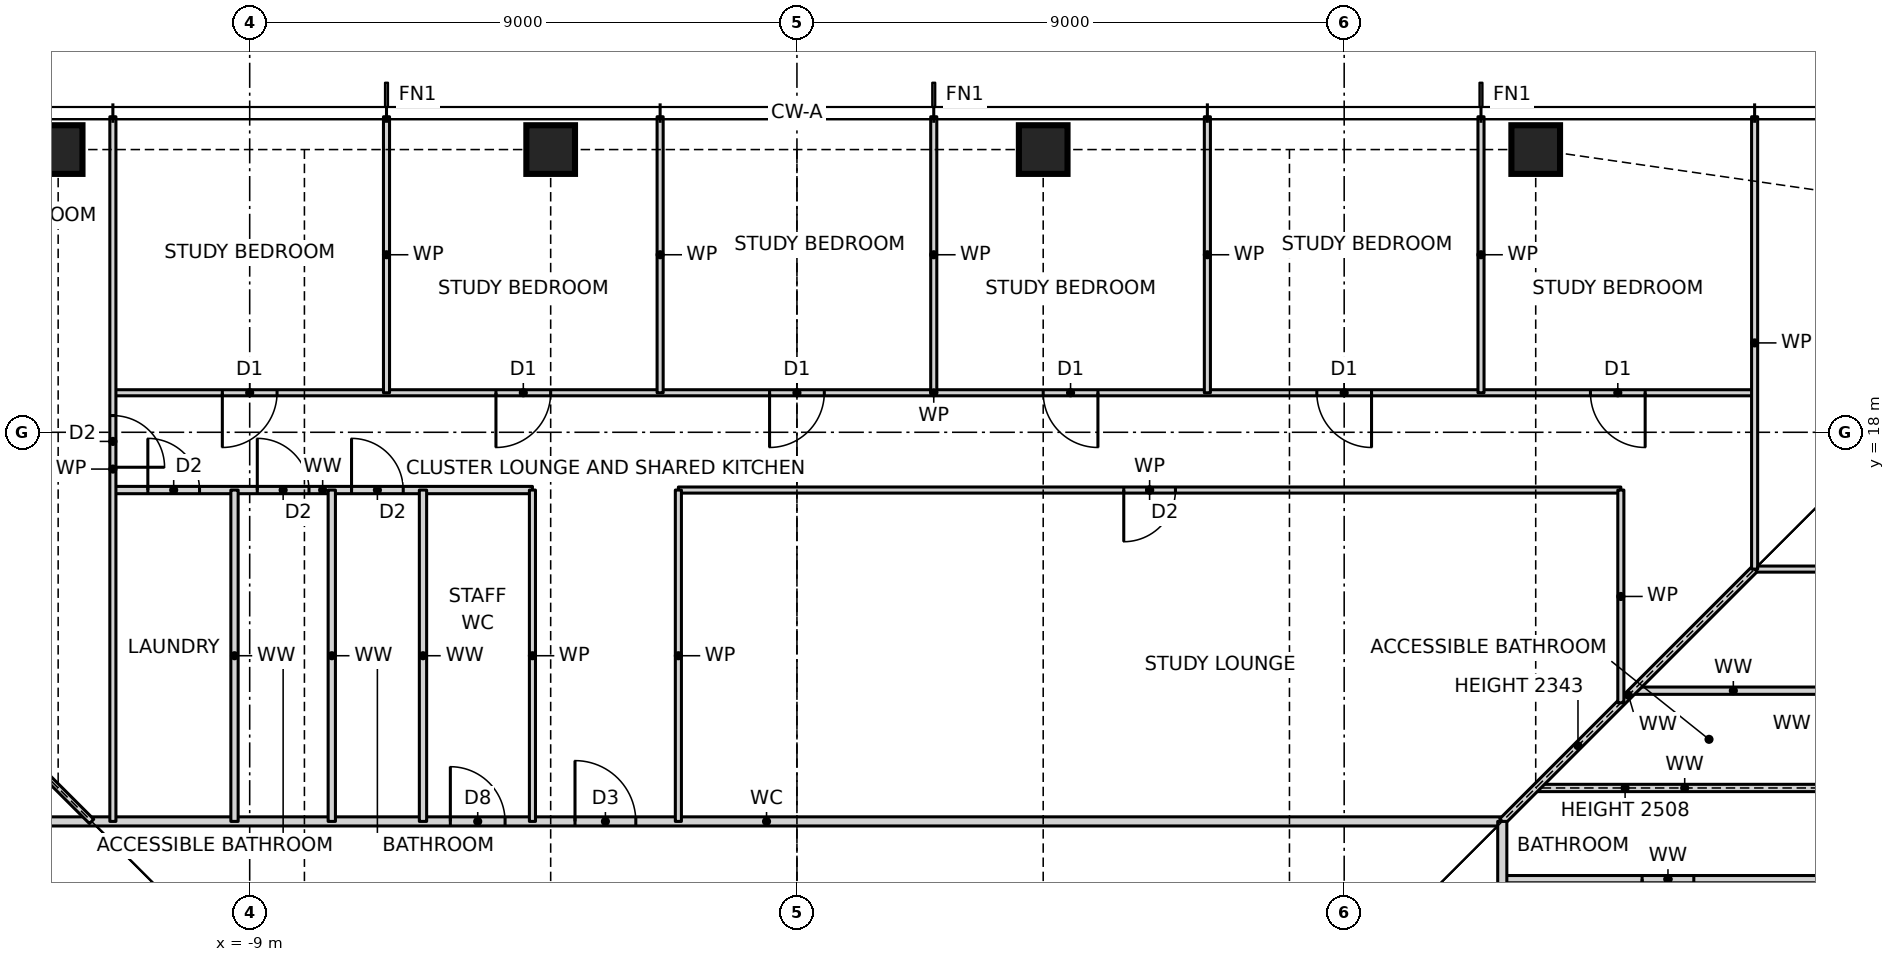
"""IFC4 building model, lengths in metres.
Left out: names, types, materials, properties, quantities, classifications, styles, units other than length and angle.
Written with IfcOpenShell. Run it as: python <this file> out.ifc"""

import sys

from ifc_helpers import new_model, si_unit, direction, frame, frame_2d, origin, origin_2d, place, context, subcontext, project, spatial, rectangle, hollow_rectangle, extrude, element, fill, save


model = new_model("IFC4")
c1 = context("Model", 3, precision=1e-05, world=origin(), true_north=direction((0.0, 1.0)))
c2 = subcontext(c1, "Body", "Model", "MODEL_VIEW")
j1 = project(units=[si_unit("LENGTHUNIT", "METRE"), si_unit("PLANEANGLEUNIT", "RADIAN")], contexts=[c1])
p1 = place(None, origin())
s1 = spatial("IfcSite", under=j1, at=p1, CompositionType="ELEMENT")
p2 = place(p1, origin())
s2 = spatial("IfcBuilding", under=s1, at=p2, CompositionType="ELEMENT")
p3 = place(p2, frame((0.0, 0.0, 53.5)))
s3 = spatial("IfcBuildingStorey", under=s2, at=p3, CompositionType="ELEMENT", Elevation=53.5)
for number, where, z_axis, x_axis in (
    (1, (12.15, 22.65, 0.0), (0.0, 0.0, 1.0), (1.0, 0.0, 0.0)),
    (2, (4.05, 22.65, 0.0), (0.0, 0.0, 1.0), (1.0, 0.0, 0.0)),
    (3, (-4.05, 22.65, 0.0), (0.0, 0.0, 1.0), (1.0, 0.0, 0.0)),
    (4, (-12.15, 22.65, 0.0), (0.0, 0.0, 1.0), (1.0, 0.0, 0.0)),
):
    element("IfcColumn", number, at=place(p3, frame(where, z_axis=z_axis, x_axis=x_axis)), inside=s3, PredefinedType="COLUMN", context=c2, shape_type="SweptSolid", body=[
        extrude(hollow_rectangle(XDim=0.8, YDim=0.8, WallThickness=0.09, at=origin_2d()), origin(), (0.0, 0.0, 1.0), 3.5),
    ])
p4 = place(p3, frame((11.6, 10.65, 0.0), z_axis=(0.0, 0.0, 1.0), x_axis=(1.0, 0.0, 0.0)))
e5 = element("IfcWall", 5, at=p4, inside=s3, PredefinedType="PARTITIONING", context=c2, shape_type="SweptSolid", body=[
    extrude(rectangle(XDim=5.45, YDim=0.12, at=frame_2d((2.725, 0.0))), origin(), (0.0, 0.0, 1.0), 3.27),
])
p5 = place(p4, frame((2.3, 0.0, 0.0)))
e6 = element("IfcOpeningElement", 6, at=p5, cuts=e5, PredefinedType="OPENING", context=c2, shape_type="SweptSolid", body=[
    extrude(rectangle(XDim=0.85, YDim=2.1, at=frame_2d((0.425, 1.05))), frame((0.0, 0.07, 0.0), z_axis=(0.0, -1.0, 0.0), x_axis=(1.0, 0.0, 0.0)), (0.0, 0.0, 1.0), 0.14),
])
p6 = place(p3, frame((-12.6, 11.6, 0.0), z_axis=(0.0, 0.0, 1.0), x_axis=(1.0, 0.0, 0.0)))
e7 = element("IfcWall", 7, at=p6, inside=s3, PredefinedType="PARTITIONING", context=c2, shape_type="SweptSolid", body=[
    extrude(rectangle(XDim=24.2, YDim=0.15, at=frame_2d((12.1, 0.0))), origin(), (0.0, 0.0, 1.0), 3.27),
])
p7 = place(p6, frame((8.95, 0.0, 0.0)))
e8 = element("IfcOpeningElement", 8, at=p7, cuts=e7, PredefinedType="OPENING", context=c2, shape_type="SweptSolid", body=[
    extrude(rectangle(XDim=1.0, YDim=2.1, at=frame_2d((0.5, 1.05))), frame((0.0, 0.085, 0.0), z_axis=(0.0, -1.0, 0.0), x_axis=(1.0, 0.0, 0.0)), (0.0, 0.0, 1.0), 0.17),
])
p8 = place(p6, frame((6.9, 0.0, 0.0)))
e9 = element("IfcOpeningElement", 9, at=p8, cuts=e7, PredefinedType="OPENING", context=c2, shape_type="SweptSolid", body=[
    extrude(rectangle(XDim=0.9, YDim=2.1, at=frame_2d((0.45, 1.05))), frame((0.0, 0.085, 0.0), z_axis=(0.0, -1.0, 0.0), x_axis=(1.0, 0.0, 0.0)), (0.0, 0.0, 1.0), 0.17),
])
p9 = place(p3, frame((12.15, 12.15, 0.0), z_axis=(0.0, 0.0, 1.0), x_axis=(1.0, 0.0, 0.0)))
e10 = element("IfcWall", 10, at=p9, inside=s3, PredefinedType="PARTITIONING", context=c2, shape_type="SweptSolid", body=[
    extrude(rectangle(XDim=4.9, YDim=0.12, at=frame_2d((2.45, 0.0))), origin(), (0.0, 0.0, 1.0), 2.508),
])
p10 = place(p3, frame((13.75, 13.75, 0.0), z_axis=(0.0, 0.0, 1.0), x_axis=(1.0, 0.0, 0.0)))
e11 = element("IfcWall", 11, at=p10, inside=s3, PredefinedType="PARTITIONING", context=c2, shape_type="SweptSolid", body=[
    extrude(rectangle(XDim=3.3, YDim=0.12, at=frame_2d((1.65, 0.0))), origin(), (0.0, 0.0, 1.0), 3.27),
])
p11 = place(p3, frame((15.75, 15.75, 0.0), z_axis=(0.0, 0.0, 1.0), x_axis=(1.0, 0.0, 0.0)))
e12 = element("IfcWall", 12, at=p11, inside=s3, PredefinedType="PARTITIONING", context=c2, shape_type="SweptSolid", body=[
    extrude(rectangle(XDim=7.44, YDim=0.1, at=frame_2d((3.72, 0.0))), origin(), (0.0, 0.0, 1.0), 3.27),
])
p12 = place(p11, frame((1.675, 0.0, 0.0)))
e13 = element("IfcOpeningElement", 13, at=p12, cuts=e12, PredefinedType="OPENING", context=c2, shape_type="SweptSolid", body=[
    extrude(rectangle(XDim=0.85, YDim=2.1, at=frame_2d((0.425, 1.05))), frame((0.0, 0.06, 0.0), z_axis=(0.0, -1.0, 0.0), x_axis=(1.0, 0.0, 0.0)), (0.0, 0.0, 1.0), 0.12),
])
p13 = place(p3, frame((-11.25, 17.05, 0.0), z_axis=(0.0, 0.0, 1.0), x_axis=(1.0, 0.0, 0.0)))
e14 = element("IfcWall", 14, at=p13, inside=s3, PredefinedType="PARTITIONING", context=c2, shape_type="SweptSolid", body=[
    extrude(rectangle(XDim=6.9, YDim=0.12, at=frame_2d((3.45, 0.0))), origin(), (0.0, 0.0, 1.0), 3.27),
])
p14 = place(p13, frame((3.925, 0.0, 0.0)))
e15 = element("IfcOpeningElement", 15, at=p14, cuts=e14, PredefinedType="OPENING", context=c2, shape_type="SweptSolid", body=[
    extrude(rectangle(XDim=0.85, YDim=2.1, at=frame_2d((0.425, 1.05))), frame((0.0, 0.07, 0.0), z_axis=(0.0, -1.0, 0.0), x_axis=(1.0, 0.0, 0.0)), (0.0, 0.0, 1.0), 0.14),
])
p15 = place(p13, frame((2.375, 0.0, 0.0)))
e16 = element("IfcOpeningElement", 16, at=p15, cuts=e14, PredefinedType="OPENING", context=c2, shape_type="SweptSolid", body=[
    extrude(rectangle(XDim=0.85, YDim=2.1, at=frame_2d((0.425, 1.05))), frame((0.0, 0.07, 0.0), z_axis=(0.0, -1.0, 0.0), x_axis=(1.0, 0.0, 0.0)), (0.0, 0.0, 1.0), 0.14),
])
p16 = place(p13, frame((0.575, 0.0, 0.0)))
e17 = element("IfcOpeningElement", 17, at=p16, cuts=e14, PredefinedType="OPENING", context=c2, shape_type="SweptSolid", body=[
    extrude(rectangle(XDim=0.85, YDim=2.1, at=frame_2d((0.425, 1.05))), frame((0.0, 0.07, 0.0), z_axis=(0.0, -1.0, 0.0), x_axis=(1.0, 0.0, 0.0)), (0.0, 0.0, 1.0), 0.14),
])
p17 = place(p3, frame((-1.95, 17.05, 0.0), z_axis=(0.0, 0.0, 1.0), x_axis=(1.0, 0.0, 0.0)))
e18 = element("IfcWall", 18, at=p17, inside=s3, PredefinedType="PARTITIONING", context=c2, shape_type="SweptSolid", body=[
    extrude(rectangle(XDim=15.5, YDim=0.1, at=frame_2d((7.75, 0.0))), origin(), (0.0, 0.0, 1.0), 3.27),
])
p18 = place(p17, frame((7.325, 0.0, 0.0)))
e19 = element("IfcOpeningElement", 19, at=p18, cuts=e18, PredefinedType="OPENING", context=c2, shape_type="SweptSolid", body=[
    extrude(rectangle(XDim=0.85, YDim=2.1, at=frame_2d((0.425, 1.05))), frame((0.0, 0.06, 0.0), z_axis=(0.0, -1.0, 0.0), x_axis=(1.0, 0.0, 0.0)), (0.0, 0.0, 1.0), 0.12),
])
p19 = place(p3, frame((-11.25, 18.65, 0.0), z_axis=(0.0, 0.0, 1.0), x_axis=(1.0, 0.0, 0.0)))
e20 = element("IfcWall", 20, at=p19, inside=s3, PredefinedType="PARTITIONING", context=c2, shape_type="SweptSolid", body=[
    extrude(rectangle(XDim=27.0, YDim=0.1, at=frame_2d((13.5, 0.0))), origin(), (0.0, 0.0, 1.0), 3.27),
])
p20 = place(p19, frame((24.3, 0.0, 0.0)))
e21 = element("IfcOpeningElement", 21, at=p20, cuts=e20, PredefinedType="OPENING", context=c2, shape_type="SweptSolid", body=[
    extrude(rectangle(XDim=0.9, YDim=2.1, at=frame_2d((0.45, 1.05))), frame((0.0, 0.06, 0.0), z_axis=(0.0, -1.0, 0.0), x_axis=(1.0, 0.0, 0.0)), (0.0, 0.0, 1.0), 0.12),
])
p21 = place(p19, frame((19.8, 0.0, 0.0)))
e22 = element("IfcOpeningElement", 22, at=p21, cuts=e20, PredefinedType="OPENING", context=c2, shape_type="SweptSolid", body=[
    extrude(rectangle(XDim=0.9, YDim=2.1, at=frame_2d((0.45, 1.05))), frame((0.0, 0.06, 0.0), z_axis=(0.0, -1.0, 0.0), x_axis=(1.0, 0.0, 0.0)), (0.0, 0.0, 1.0), 0.12),
])
p22 = place(p19, frame((15.3, 0.0, 0.0)))
e23 = element("IfcOpeningElement", 23, at=p22, cuts=e20, PredefinedType="OPENING", context=c2, shape_type="SweptSolid", body=[
    extrude(rectangle(XDim=0.9, YDim=2.1, at=frame_2d((0.45, 1.05))), frame((0.0, 0.06, 0.0), z_axis=(0.0, -1.0, 0.0), x_axis=(1.0, 0.0, 0.0)), (0.0, 0.0, 1.0), 0.12),
])
p23 = place(p19, frame((10.8, 0.0, 0.0)))
e24 = element("IfcOpeningElement", 24, at=p23, cuts=e20, PredefinedType="OPENING", context=c2, shape_type="SweptSolid", body=[
    extrude(rectangle(XDim=0.9, YDim=2.1, at=frame_2d((0.45, 1.05))), frame((0.0, 0.06, 0.0), z_axis=(0.0, -1.0, 0.0), x_axis=(1.0, 0.0, 0.0)), (0.0, 0.0, 1.0), 0.12),
])
p24 = place(p19, frame((6.3, 0.0, 0.0)))
e25 = element("IfcOpeningElement", 25, at=p24, cuts=e20, PredefinedType="OPENING", context=c2, shape_type="SweptSolid", body=[
    extrude(rectangle(XDim=0.9, YDim=2.1, at=frame_2d((0.45, 1.05))), frame((0.0, 0.06, 0.0), z_axis=(0.0, -1.0, 0.0), x_axis=(1.0, 0.0, 0.0)), (0.0, 0.0, 1.0), 0.12),
])
p25 = place(p19, frame((1.8, 0.0, 0.0)))
e26 = element("IfcOpeningElement", 26, at=p25, cuts=e20, PredefinedType="OPENING", context=c2, shape_type="SweptSolid", body=[
    extrude(rectangle(XDim=0.9, YDim=2.1, at=frame_2d((0.45, 1.05))), frame((0.0, 0.06, 0.0), z_axis=(0.0, -1.0, 0.0), x_axis=(1.0, 0.0, 0.0)), (0.0, 0.0, 1.0), 0.12),
])
p26 = place(p3, frame((11.6, 11.6, 0.0), z_axis=(0.0, 0.0, 1.0), x_axis=(0.707106781187, 0.707106781187, 0.0)))
e27 = element("IfcWall", 27, at=p26, inside=s3, PredefinedType="PARTITIONING", context=c2, shape_type="SweptSolid", body=[
    extrude(rectangle(XDim=5.869, YDim=0.12, at=frame_2d((2.935, 0.0))), origin(), (0.0, 0.0, 1.0), 2.343),
])
p27 = place(p3, frame((15.75, 15.75, 0.0), z_axis=(0.0, 0.0, 1.0), x_axis=(0.0, 1.0, 0.0)))
e28 = element("IfcWall", 28, at=p27, inside=s3, PredefinedType="PARTITIONING", context=c2, shape_type="SweptSolid", body=[
    extrude(rectangle(XDim=7.44, YDim=0.1, at=frame_2d((3.72, 0.0))), origin(), (0.0, 0.0, 1.0), 3.27),
])
p28 = place(p3, frame((13.55, 13.55, 0.0), z_axis=(0.0, 0.0, 1.0), x_axis=(0.0, 1.0, 0.0)))
e29 = element("IfcWall", 29, at=p28, inside=s3, PredefinedType="PARTITIONING", context=c2, shape_type="SweptSolid", body=[
    extrude(rectangle(XDim=3.5, YDim=0.1, at=frame_2d((1.75, 0.0))), origin(), (0.0, 0.0, 1.0), 3.27),
])
p29 = place(p3, frame((11.6, -11.6, 0.0), z_axis=(0.0, 0.0, 1.0), x_axis=(0.0, 1.0, 0.0)))
e30 = element("IfcWall", 30, at=p29, inside=s3, PredefinedType="PARTITIONING", context=c2, shape_type="SweptSolid", body=[
    extrude(rectangle(XDim=23.2, YDim=0.15, at=frame_2d((11.6, 0.0))), origin(), (0.0, 0.0, 1.0), 3.27),
])
p30 = place(p29, frame((20.55, 0.0, 0.0)))
e31 = element("IfcOpeningElement", 31, at=p30, cuts=e30, PredefinedType="OPENING", context=c2, shape_type="SweptSolid", body=[
    extrude(rectangle(XDim=1.0, YDim=2.1, at=frame_2d((0.5, 1.05))), frame((0.0, 0.085, 0.0), z_axis=(0.0, -1.0, 0.0), x_axis=(1.0, 0.0, 0.0)), (0.0, 0.0, 1.0), 0.17),
])
for number, where, z_axis, x_axis in (
    (32, (11.25, 18.65, 0.0), (0.0, 0.0, 1.0), (0.0, 1.0, 0.0)),
    (33, (6.75, 18.65, 0.0), (0.0, 0.0, 1.0), (0.0, 1.0, 0.0)),
    (34, (2.25, 18.65, 0.0), (0.0, 0.0, 1.0), (0.0, 1.0, 0.0)),
):
    element("IfcWall", number, at=place(p3, frame(where, z_axis=z_axis, x_axis=x_axis)), inside=s3, PredefinedType="PARTITIONING", context=c2, shape_type="SweptSolid", body=[
        extrude(rectangle(XDim=4.54, YDim=0.1, at=frame_2d((2.27, 0.0))), origin(), (0.0, 0.0, 1.0), 3.27),
    ])
p31 = place(p3, frame((-1.95, 11.6, 0.0), z_axis=(0.0, 0.0, 1.0), x_axis=(0.0, 1.0, 0.0)))
e35 = element("IfcWall", 35, at=p31, inside=s3, PredefinedType="PARTITIONING", context=c2, shape_type="SweptSolid", body=[
    extrude(rectangle(XDim=5.45, YDim=0.1, at=frame_2d((2.725, 0.0))), origin(), (0.0, 0.0, 1.0), 3.27),
])
p32 = place(p3, frame((-2.25, 18.65, 0.0), z_axis=(0.0, 0.0, 1.0), x_axis=(0.0, 1.0, 0.0)))
e36 = element("IfcWall", 36, at=p32, inside=s3, PredefinedType="PARTITIONING", context=c2, shape_type="SweptSolid", body=[
    extrude(rectangle(XDim=4.54, YDim=0.1, at=frame_2d((2.27, 0.0))), origin(), (0.0, 0.0, 1.0), 3.27),
])
p33 = place(p3, frame((-4.35, 11.6, 0.0), z_axis=(0.0, 0.0, 1.0), x_axis=(0.0, 1.0, 0.0)))
e37 = element("IfcWall", 37, at=p33, inside=s3, PredefinedType="PARTITIONING", context=c2, shape_type="SweptSolid", body=[
    extrude(rectangle(XDim=5.45, YDim=0.1, at=frame_2d((2.725, 0.0))), origin(), (0.0, 0.0, 1.0), 3.27),
])
p34 = place(p3, frame((-6.15, 11.6, 0.0), z_axis=(0.0, 0.0, 1.0), x_axis=(0.0, 1.0, 0.0)))
e38 = element("IfcWall", 38, at=p34, inside=s3, PredefinedType="PARTITIONING", context=c2, shape_type="SweptSolid", body=[
    extrude(rectangle(XDim=5.45, YDim=0.12, at=frame_2d((2.725, 0.0))), origin(), (0.0, 0.0, 1.0), 3.27),
])
p35 = place(p3, frame((-6.75, 18.65, 0.0), z_axis=(0.0, 0.0, 1.0), x_axis=(0.0, 1.0, 0.0)))
e39 = element("IfcWall", 39, at=p35, inside=s3, PredefinedType="PARTITIONING", context=c2, shape_type="SweptSolid", body=[
    extrude(rectangle(XDim=4.54, YDim=0.1, at=frame_2d((2.27, 0.0))), origin(), (0.0, 0.0, 1.0), 3.27),
])
for number, where, z_axis, x_axis in (
    (40, (-7.65, 11.6, 0.0), (0.0, 0.0, 1.0), (0.0, 1.0, 0.0)),
    (41, (-9.25, 11.6, 0.0), (0.0, 0.0, 1.0), (0.0, 1.0, 0.0)),
):
    element("IfcWall", number, at=place(p3, frame(where, z_axis=z_axis, x_axis=x_axis)), inside=s3, PredefinedType="PARTITIONING", context=c2, shape_type="SweptSolid", body=[
        extrude(rectangle(XDim=5.45, YDim=0.12, at=frame_2d((2.725, 0.0))), origin(), (0.0, 0.0, 1.0), 3.27),
    ])
p36 = place(p3, frame((-11.25, 11.6, 0.0), z_axis=(0.0, 0.0, 1.0), x_axis=(0.0, 1.0, 0.0)))
e42 = element("IfcWall", 42, at=p36, inside=s3, PredefinedType="PARTITIONING", context=c2, shape_type="SweptSolid", body=[
    extrude(rectangle(XDim=11.59, YDim=0.1, at=frame_2d((5.795, 0.0))), origin(), (0.0, 0.0, 1.0), 3.27),
])
p37 = place(p36, frame((5.825, 0.0, 0.0)))
e43 = element("IfcOpeningElement", 43, at=p37, cuts=e42, PredefinedType="OPENING", context=c2, shape_type="SweptSolid", body=[
    extrude(rectangle(XDim=0.85, YDim=2.1, at=frame_2d((0.425, 1.05))), frame((0.0, 0.06, 0.0), z_axis=(0.0, -1.0, 0.0), x_axis=(1.0, 0.0, 0.0)), (0.0, 0.0, 1.0), 0.12),
])
p38 = place(p3, frame((-11.6, 11.6, 0.0), z_axis=(0.0, 0.0, 1.0), x_axis=(-0.707106781187, 0.707106781187, 0.0)))
e44 = element("IfcWall", 44, at=p38, inside=s3, PredefinedType="PARTITIONING", context=c2, shape_type="SweptSolid", body=[
    extrude(rectangle(XDim=5.869, YDim=0.1, at=frame_2d((2.935, 0.0))), origin(), (0.0, 0.0, 1.0), 2.343),
])
p39 = place(p5, frame((0.85, 0.0, 0.0), z_axis=(0.0, 0.0, 1.0), x_axis=(-1.0, 0.0, 0.0)))
e45 = element("IfcDoor", 45, at=p39, inside=s3, OperationType="SINGLE_SWING_RIGHT", PredefinedType="DOOR", context=c2, shape_type="SweptSolid", body=[
    extrude(rectangle(XDim=0.85, YDim=2.1, at=frame_2d((0.425, 1.05))), frame((0.0, 0.025, 0.0), z_axis=(0.0, -1.0, 0.0), x_axis=(1.0, 0.0, 0.0)), (0.0, 0.0, 1.0), 0.05),
])
fill(e6, e45)
p40 = place(p20, frame((0.9, 0.0, 0.0), z_axis=(0.0, 0.0, 1.0), x_axis=(-1.0, 0.0, 0.0)))
e46 = element("IfcDoor", 46, at=p40, inside=s3, OperationType="SINGLE_SWING_LEFT", PredefinedType="DOOR", context=c2, shape_type="SweptSolid", body=[
    extrude(rectangle(XDim=0.9, YDim=2.1, at=frame_2d((0.45, 1.05))), frame((0.0, 0.025, 0.0), z_axis=(0.0, -1.0, 0.0), x_axis=(1.0, 0.0, 0.0)), (0.0, 0.0, 1.0), 0.05),
])
fill(e21, e46)
p41 = place(p21, frame((0.9, 0.0, 0.0), z_axis=(0.0, 0.0, 1.0), x_axis=(-1.0, 0.0, 0.0)))
e47 = element("IfcDoor", 47, at=p41, inside=s3, OperationType="SINGLE_SWING_LEFT", PredefinedType="DOOR", context=c2, shape_type="SweptSolid", body=[
    extrude(rectangle(XDim=0.9, YDim=2.1, at=frame_2d((0.45, 1.05))), frame((0.0, 0.025, 0.0), z_axis=(0.0, -1.0, 0.0), x_axis=(1.0, 0.0, 0.0)), (0.0, 0.0, 1.0), 0.05),
])
fill(e22, e47)
p42 = place(p22, frame((0.9, 0.0, 0.0), z_axis=(0.0, 0.0, 1.0), x_axis=(-1.0, 0.0, 0.0)))
e48 = element("IfcDoor", 48, at=p42, inside=s3, OperationType="SINGLE_SWING_LEFT", PredefinedType="DOOR", context=c2, shape_type="SweptSolid", body=[
    extrude(rectangle(XDim=0.9, YDim=2.1, at=frame_2d((0.45, 1.05))), frame((0.0, 0.025, 0.0), z_axis=(0.0, -1.0, 0.0), x_axis=(1.0, 0.0, 0.0)), (0.0, 0.0, 1.0), 0.05),
])
fill(e23, e48)
p43 = place(p23, frame((0.9, 0.0, 0.0), z_axis=(0.0, 0.0, 1.0), x_axis=(-1.0, 0.0, 0.0)))
e49 = element("IfcDoor", 49, at=p43, inside=s3, OperationType="SINGLE_SWING_RIGHT", PredefinedType="DOOR", context=c2, shape_type="SweptSolid", body=[
    extrude(rectangle(XDim=0.9, YDim=2.1, at=frame_2d((0.45, 1.05))), frame((0.0, 0.025, 0.0), z_axis=(0.0, -1.0, 0.0), x_axis=(1.0, 0.0, 0.0)), (0.0, 0.0, 1.0), 0.05),
])
fill(e24, e49)
p44 = place(p24, frame((0.9, 0.0, 0.0), z_axis=(0.0, 0.0, 1.0), x_axis=(-1.0, 0.0, 0.0)))
e50 = element("IfcDoor", 50, at=p44, inside=s3, OperationType="SINGLE_SWING_RIGHT", PredefinedType="DOOR", context=c2, shape_type="SweptSolid", body=[
    extrude(rectangle(XDim=0.9, YDim=2.1, at=frame_2d((0.45, 1.05))), frame((0.0, 0.025, 0.0), z_axis=(0.0, -1.0, 0.0), x_axis=(1.0, 0.0, 0.0)), (0.0, 0.0, 1.0), 0.05),
])
fill(e25, e50)
p45 = place(p25, frame((0.9, 0.0, 0.0), z_axis=(0.0, 0.0, 1.0), x_axis=(-1.0, 0.0, 0.0)))
e51 = element("IfcDoor", 51, at=p45, inside=s3, OperationType="SINGLE_SWING_RIGHT", PredefinedType="DOOR", context=c2, shape_type="SweptSolid", body=[
    extrude(rectangle(XDim=0.9, YDim=2.1, at=frame_2d((0.45, 1.05))), frame((0.0, 0.025, 0.0), z_axis=(0.0, -1.0, 0.0), x_axis=(1.0, 0.0, 0.0)), (0.0, 0.0, 1.0), 0.05),
])
fill(e26, e51)
p46 = place(p7, origin())
e52 = element("IfcDoor", 52, at=p46, inside=s3, OperationType="SINGLE_SWING_LEFT", PredefinedType="DOOR", context=c2, shape_type="SweptSolid", body=[
    extrude(rectangle(XDim=1.0, YDim=2.1, at=frame_2d((0.5, 1.05))), frame((0.0, 0.025, 0.0), z_axis=(0.0, -1.0, 0.0), x_axis=(1.0, 0.0, 0.0)), (0.0, 0.0, 1.0), 0.05),
])
fill(e8, e52)
p47 = place(p18, frame((0.85, 0.0, 0.0), z_axis=(0.0, 0.0, 1.0), x_axis=(-1.0, 0.0, 0.0)))
e53 = element("IfcDoor", 53, at=p47, inside=s3, OperationType="SINGLE_SWING_RIGHT", PredefinedType="DOOR", context=c2, shape_type="SweptSolid", body=[
    extrude(rectangle(XDim=0.85, YDim=2.1, at=frame_2d((0.425, 1.05))), frame((0.0, 0.025, 0.0), z_axis=(0.0, -1.0, 0.0), x_axis=(1.0, 0.0, 0.0)), (0.0, 0.0, 1.0), 0.05),
])
fill(e19, e53)
p48 = place(p8, origin())
e54 = element("IfcDoor", 54, at=p48, inside=s3, OperationType="SINGLE_SWING_LEFT", PredefinedType="DOOR", context=c2, shape_type="SweptSolid", body=[
    extrude(rectangle(XDim=0.9, YDim=2.1, at=frame_2d((0.45, 1.05))), frame((0.0, 0.025, 0.0), z_axis=(0.0, -1.0, 0.0), x_axis=(1.0, 0.0, 0.0)), (0.0, 0.0, 1.0), 0.05),
])
fill(e9, e54)
p49 = place(p14, origin())
e55 = element("IfcDoor", 55, at=p49, inside=s3, OperationType="SINGLE_SWING_LEFT", PredefinedType="DOOR", context=c2, shape_type="SweptSolid", body=[
    extrude(rectangle(XDim=0.85, YDim=2.1, at=frame_2d((0.425, 1.05))), frame((0.0, 0.025, 0.0), z_axis=(0.0, -1.0, 0.0), x_axis=(1.0, 0.0, 0.0)), (0.0, 0.0, 1.0), 0.05),
])
fill(e15, e55)
p50 = place(p15, origin())
e56 = element("IfcDoor", 56, at=p50, inside=s3, OperationType="SINGLE_SWING_LEFT", PredefinedType="DOOR", context=c2, shape_type="SweptSolid", body=[
    extrude(rectangle(XDim=0.85, YDim=2.1, at=frame_2d((0.425, 1.05))), frame((0.0, 0.025, 0.0), z_axis=(0.0, -1.0, 0.0), x_axis=(1.0, 0.0, 0.0)), (0.0, 0.0, 1.0), 0.05),
])
fill(e16, e56)
p51 = place(p16, origin())
e57 = element("IfcDoor", 57, at=p51, inside=s3, OperationType="SINGLE_SWING_LEFT", PredefinedType="DOOR", context=c2, shape_type="SweptSolid", body=[
    extrude(rectangle(XDim=0.85, YDim=2.1, at=frame_2d((0.425, 1.05))), frame((0.0, 0.025, 0.0), z_axis=(0.0, -1.0, 0.0), x_axis=(1.0, 0.0, 0.0)), (0.0, 0.0, 1.0), 0.05),
])
fill(e17, e57)
p52 = place(p37, frame((0.85, 0.0, 0.0), z_axis=(0.0, 0.0, 1.0), x_axis=(-1.0, 0.0, 0.0)))
e58 = element("IfcDoor", 58, at=p52, inside=s3, OperationType="SINGLE_SWING_RIGHT", PredefinedType="DOOR", context=c2, shape_type="SweptSolid", body=[
    extrude(rectangle(XDim=0.85, YDim=2.1, at=frame_2d((0.425, 1.05))), frame((0.0, 0.025, 0.0), z_axis=(0.0, -1.0, 0.0), x_axis=(1.0, 0.0, 0.0)), (0.0, 0.0, 1.0), 0.05),
])
fill(e43, e58)
save(model, sys.argv[1])
